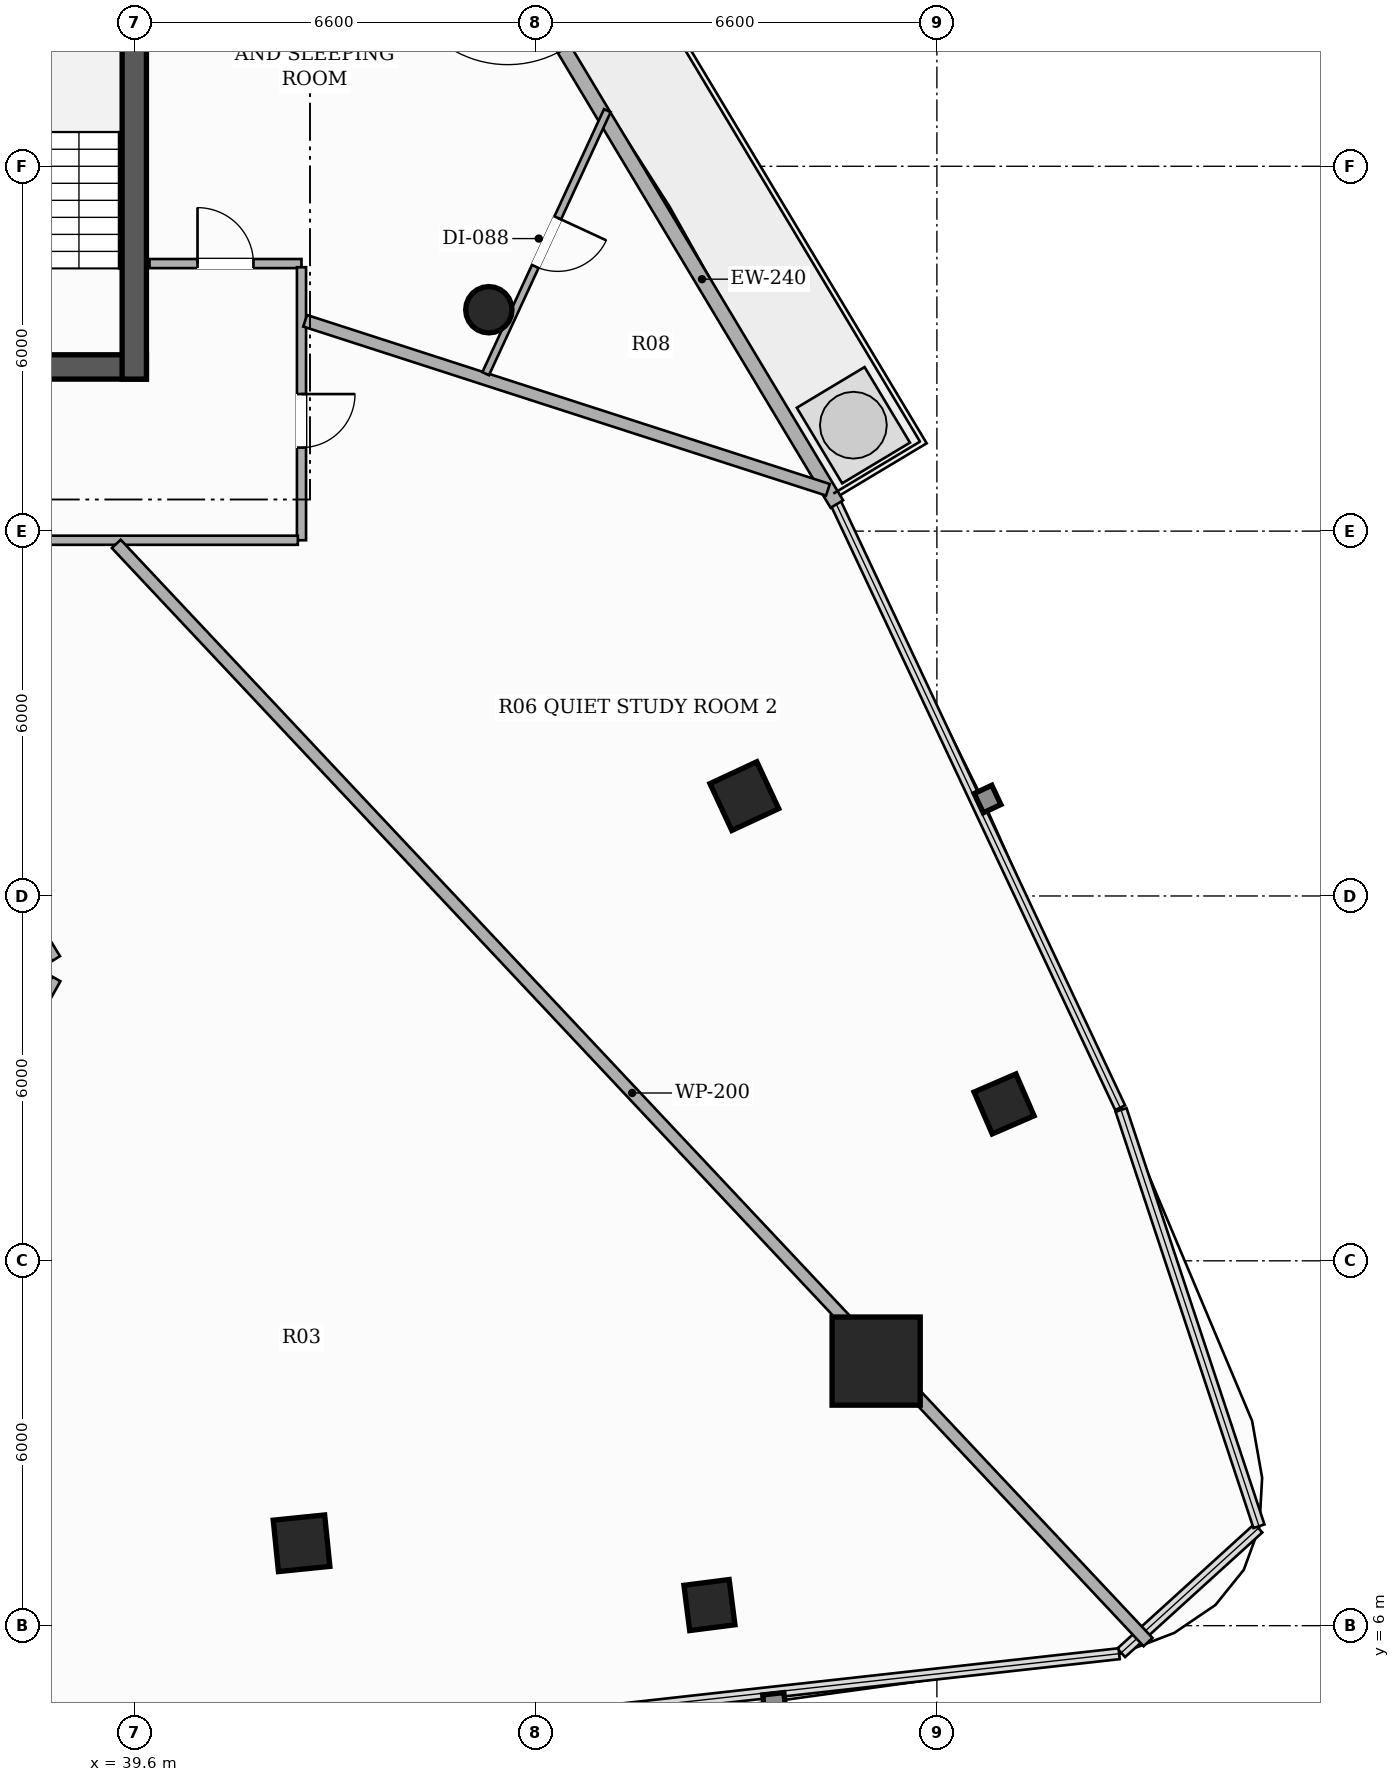
"""IFC4 building model, lengths in metres.
Left out: names, types, materials, properties, quantities, classifications, styles, units other than length and angle.
Written with IfcOpenShell. Run it as: python <this file> out.ifc"""

import sys

from ifc_helpers import new_model, si_unit, direction, frame, frame_2d, origin, origin_2d, place, context, subcontext, project, spatial, rectangle, hollow_rectangle, hollow_circle, extrude, element, fill, save


model = new_model("IFC4")
c1 = context("Model", 3, precision=1e-05, world=origin(), true_north=direction((0.0, 1.0)))
c2 = subcontext(c1, "Body", "Model", "MODEL_VIEW")
j1 = project(units=[si_unit("LENGTHUNIT", "METRE"), si_unit("PLANEANGLEUNIT", "RADIAN")], contexts=[c1])
p1 = place(None, origin())
s1 = spatial("IfcSite", under=j1, at=p1, CompositionType="ELEMENT")
p2 = place(p1, origin())
s2 = spatial("IfcBuilding", under=s1, at=p2, CompositionType="ELEMENT")
p3 = place(p2, frame((0.0, 0.0, 157.25)))
s3 = spatial("IfcBuildingStorey", under=s2, at=p3, CompositionType="ELEMENT", Elevation=157.25)
p4 = place(p3, frame((26.2, 26.7, 0.0), z_axis=(0.0, 0.0, 1.0), x_axis=(1.0, 0.0, 0.0)))
e1 = element("IfcWall", 1, at=p4, inside=s3, PredefinedType="SHEAR", context=c2, shape_type="SweptSolid", body=[
    extrude(rectangle(XDim=13.6, YDim=0.4, at=frame_2d((6.8, 0.0))), origin(), (0.0, 0.0, 1.0), 3.3),
])
p5 = place(p4, frame((4.35, 0.0, 0.0)))
e2 = element("IfcOpeningElement", 2, at=p5, cuts=e1, PredefinedType="OPENING", context=c2, shape_type="SweptSolid", body=[
    extrude(rectangle(XDim=1.05, YDim=2.15, at=frame_2d((0.525, 1.075))), frame((0.0, 0.21, 0.0), z_axis=(0.0, -1.0, 0.0), x_axis=(1.0, 0.0, 0.0)), (0.0, 0.0, 1.0), 0.42),
])
p6 = place(p4, frame((8.3, 0.0, 0.0)))
e3 = element("IfcOpeningElement", 3, at=p6, cuts=e1, PredefinedType="OPENING", context=c2, shape_type="SweptSolid", body=[
    extrude(rectangle(XDim=1.05, YDim=2.15, at=frame_2d((0.525, 1.075))), frame((0.0, 0.21, 0.0), z_axis=(0.0, -1.0, 0.0), x_axis=(1.0, 0.0, 0.0)), (0.0, 0.0, 1.0), 0.42),
])
p7 = place(p3, frame((39.6, 26.5, 0.0), z_axis=(0.0, 0.0, 1.0), x_axis=(0.0, 1.0, 0.0)))
e4 = element("IfcWall", 4, at=p7, inside=s3, PredefinedType="SHEAR", context=c2, shape_type="SweptSolid", body=[
    extrude(rectangle(XDim=7.6, YDim=0.4, at=frame_2d((3.8, 0.0))), origin(), (0.0, 0.0, 1.0), 3.3),
])
p8 = place(p3, frame((51.801, 10.351, 0.0), z_axis=(0.0, 0.0, 1.0), x_axis=(1.0, 0.0, 0.0)))
e5 = element("IfcColumn", 5, at=p8, inside=s3, PredefinedType="COLUMN", context=c2, shape_type="SweptSolid", body=[
    extrude(hollow_rectangle(XDim=1.45, YDim=1.45, WallThickness=0.045, at=origin_2d()), origin(), (0.0, 0.0, 1.0), 3.3),
])
for number, where, z_axis, x_axis in (
    (6, (42.351, 7.355, 0.0), (0.0, 0.0, 1.0), (0.995, 0.101, 0.0)),
    (7, (49.633, 19.642, 0.0), (0.0, 0.0, 1.0), (-0.423, 0.906, 0.0)),
):
    element("IfcColumn", number, at=place(p3, frame(where, z_axis=z_axis, x_axis=x_axis)), inside=s3, PredefinedType="COLUMN", context=c2, shape_type="SweptSolid", body=[
        extrude(hollow_rectangle(XDim=0.85, YDim=0.85, WallThickness=0.028, at=origin_2d()), origin(), (0.0, 0.0, 1.0), 3.3),
    ])
p9 = place(p3, frame((45.431, 27.641, 0.0), z_axis=(0.0, 0.0, 1.0), x_axis=(1.0, 0.0, 0.0)))
e8 = element("IfcColumn", 8, at=p9, inside=s3, PredefinedType="COLUMN", context=c2, shape_type="SweptSolid", body=[
    extrude(hollow_circle(Radius=0.381, WallThickness=0.022, at=origin_2d()), origin(), (0.0, 0.0, 1.0), 3.3),
])
for number, where, z_axis, x_axis in (
    (9, (49.059, 6.339, 0.0), (0.0, 0.0, 1.0), (0.992, 0.127, 0.0)),
    (10, (53.905, 14.58, 0.0), (0.0, 0.0, 1.0), (-0.397, 0.918, 0.0)),
):
    element("IfcColumn", number, at=place(p3, frame(where, z_axis=z_axis, x_axis=x_axis)), inside=s3, PredefinedType="COLUMN", context=c2, shape_type="SweptSolid", body=[
        extrude(hollow_rectangle(XDim=0.75, YDim=0.75, WallThickness=0.025, at=origin_2d()), origin(), (0.0, 0.0, 1.0), 3.3),
    ])
p10 = place(p3, frame((51.155, 24.445, 0.0), z_axis=(0.0, 0.0, 1.0), x_axis=(-0.514335781973, 0.857588889493, 0.0)))
e11 = element("IfcWall", 11, at=p10, inside=s3, PredefinedType="SOLIDWALL", context=c2, shape_type="SweptSolid", body=[
    extrude(rectangle(XDim=11.222, YDim=0.24, at=frame_2d((5.611, 0.0))), origin(), (0.0, 0.0, 1.0), 2.624),
])
p11 = place(p10, frame((8.725, 0.0, 0.0)))
e12 = element("IfcOpeningElement", 12, at=p11, cuts=e11, PredefinedType="OPENING", context=c2, shape_type="SweptSolid", body=[
    extrude(rectangle(XDim=1.8, YDim=2.2, at=frame_2d((0.9, 1.1))), frame((0.0, 0.13, 0.0), z_axis=(0.0, -1.0, 0.0), x_axis=(1.0, 0.0, 0.0)), (0.0, 0.0, 1.0), 0.26),
])
p12 = place(p3, frame((39.85, 28.4, 0.0), z_axis=(0.0, 0.0, 1.0), x_axis=(1.0, 0.0, 0.0)))
e13 = element("IfcWall", 13, at=p12, inside=s3, PredefinedType="PARTITIONING", context=c2, shape_type="SweptSolid", body=[
    extrude(rectangle(XDim=2.5, YDim=0.15, at=frame_2d((1.25, 0.0))), origin(), (0.0, 0.0, 1.0), 2.721),
])
p13 = place(p12, frame((0.79, 0.0, 0.0)))
e14 = element("IfcOpeningElement", 14, at=p13, cuts=e13, PredefinedType="OPENING", context=c2, shape_type="SweptSolid", body=[
    extrude(rectangle(XDim=0.92, YDim=2.15, at=frame_2d((0.46, 1.075))), frame((0.0, 0.085, 0.0), z_axis=(0.0, -1.0, 0.0), x_axis=(1.0, 0.0, 0.0)), (0.0, 0.0, 1.0), 0.17),
])
p14 = place(p3, frame((42.35, 28.34, 0.0), z_axis=(0.0, 0.0, 1.0), x_axis=(0.0, -1.0, 0.0)))
e15 = element("IfcWall", 15, at=p14, inside=s3, PredefinedType="PARTITIONING", context=c2, shape_type="SweptSolid", body=[
    extrude(rectangle(XDim=4.49, YDim=0.15, at=frame_2d((2.245, 0.0))), origin(), (0.0, 0.0, 1.0), 2.721),
])
p15 = place(p14, frame((2.086, 0.0, 0.0)))
e16 = element("IfcOpeningElement", 16, at=p15, cuts=e15, PredefinedType="OPENING", context=c2, shape_type="SweptSolid", body=[
    extrude(rectangle(XDim=0.88, YDim=2.1, at=frame_2d((0.44, 1.05))), frame((0.0, 0.085, 0.0), z_axis=(0.0, -1.0, 0.0), x_axis=(1.0, 0.0, 0.0)), (0.0, 0.0, 1.0), 0.17),
])
p16 = place(p3, frame((42.29, 23.85, 0.0), z_axis=(0.0, 0.0, 1.0), x_axis=(-1.0, 0.0, 0.0)))
e17 = element("IfcWall", 17, at=p16, inside=s3, PredefinedType="PARTITIONING", context=c2, shape_type="SweptSolid", body=[
    extrude(rectangle(XDim=8.179, YDim=0.15, at=frame_2d((4.089, 0.0))), origin(), (0.0, 0.0, 1.0), 2.492),
])
p17 = place(p16, frame((4.98, 0.0, 0.0)))
e18 = element("IfcOpeningElement", 18, at=p17, cuts=e17, PredefinedType="OPENING", context=c2, shape_type="SweptSolid", body=[
    extrude(rectangle(XDim=0.88, YDim=2.1, at=frame_2d((0.44, 1.05))), frame((0.0, 0.085, 0.0), z_axis=(0.0, -1.0, 0.0), x_axis=(1.0, 0.0, 0.0)), (0.0, 0.0, 1.0), 0.17),
])
p18 = place(p3, frame((34.147, 23.79, 0.0), z_axis=(0.0, 0.0, 1.0), x_axis=(0.521429001816, -0.853294671298, 0.0)))
e19 = element("IfcWall", 19, at=p18, inside=s3, PredefinedType="PARTITIONING", context=c2, shape_type="SweptSolid", body=[
    extrude(rectangle(XDim=7.991, YDim=0.15, at=frame_2d((3.996, 0.0))), origin(), (0.0, 0.0, 1.0), 2.721),
])
p19 = place(p3, frame((38.32, 16.635, 0.0), z_axis=(0.0, 0.0, 1.0), x_axis=(-0.489202035948, -0.872170492521, 0.0)))
e20 = element("IfcWall", 20, at=p19, inside=s3, PredefinedType="PARTITIONING", context=c2, shape_type="SweptSolid", body=[
    extrude(rectangle(XDim=1.018, YDim=0.15, at=frame_2d((0.509, 0.0))), origin(), (0.0, 0.0, 1.0), 3.06),
])
p20 = place(p3, frame((39.304, 23.79, 0.0), z_axis=(0.0, 0.0, 1.0), x_axis=(0.684750154022, -0.72877789934, 0.0)))
e21 = element("IfcWall", 21, at=p20, inside=s3, PredefinedType="PARTITIONING", context=c2, shape_type="SweptSolid", body=[
    extrude(rectangle(XDim=24.781, YDim=0.2, at=frame_2d((12.391, 0.0))), origin(), (0.0, 0.0, 1.0), 2.413),
])
p21 = place(p3, frame((42.41, 27.459, 0.0), z_axis=(0.0, 0.0, 1.0), x_axis=(0.951531988225, -0.307549793343, 0.0)))
e22 = element("IfcWall", 22, at=p21, inside=s3, PredefinedType="PARTITIONING", context=c2, shape_type="SweptSolid", body=[
    extrude(rectangle(XDim=9.036, YDim=0.2, at=frame_2d((4.518, 0.0))), origin(), (0.0, 0.0, 1.0), 2.413),
])
p22 = place(p3, frame((47.38, 30.915, 0.0), z_axis=(0.0, 0.0, 1.0), x_axis=(-0.419818119852, -0.907608255936, 0.0)))
e23 = element("IfcWall", 23, at=p22, inside=s3, PredefinedType="PARTITIONING", context=c2, shape_type="SweptSolid", body=[
    extrude(rectangle(XDim=4.766, YDim=0.12, at=frame_2d((2.383, 0.0))), origin(), (0.0, 0.0, 1.0), 2.413),
])
p23 = place(p22, frame((1.943, 0.0, 0.0)))
e24 = element("IfcOpeningElement", 24, at=p23, cuts=e23, PredefinedType="OPENING", context=c2, shape_type="SweptSolid", body=[
    extrude(rectangle(XDim=0.88, YDim=2.1, at=frame_2d((0.44, 1.05))), frame((0.0, 0.07, 0.0), z_axis=(0.0, -1.0, 0.0), x_axis=(1.0, 0.0, 0.0)), (0.0, 0.0, 1.0), 0.14),
])
p24 = place(p15, origin())
e25 = element("IfcDoor", 25, at=p24, inside=s3, OperationType="SINGLE_SWING_LEFT", PredefinedType="DOOR", context=c2, shape_type="SweptSolid", body=[
    extrude(rectangle(XDim=0.88, YDim=2.1, at=frame_2d((0.44, 1.05))), frame((0.0, 0.025, 0.0), z_axis=(0.0, -1.0, 0.0), x_axis=(1.0, 0.0, 0.0)), (0.0, 0.0, 1.0), 0.05),
])
fill(e16, e25)
p25 = place(p13, origin())
e26 = element("IfcDoor", 26, at=p25, inside=s3, OperationType="SINGLE_SWING_LEFT", PredefinedType="DOOR", context=c2, shape_type="SweptSolid", body=[
    extrude(rectangle(XDim=0.92, YDim=2.15, at=frame_2d((0.46, 1.075))), frame((0.0, 0.025, 0.0), z_axis=(0.0, -1.0, 0.0), x_axis=(1.0, 0.0, 0.0)), (0.0, 0.0, 1.0), 0.05),
])
fill(e14, e26)
p26 = place(p23, origin())
e27 = element("IfcDoor", 27, at=p26, inside=s3, OperationType="SINGLE_SWING_LEFT", PredefinedType="DOOR", context=c2, shape_type="SweptSolid", body=[
    extrude(rectangle(XDim=0.88, YDim=2.1, at=frame_2d((0.44, 1.05))), frame((0.0, 0.025, 0.0), z_axis=(0.0, -1.0, 0.0), x_axis=(1.0, 0.0, 0.0)), (0.0, 0.0, 1.0), 0.05),
])
fill(e24, e27)
save(model, sys.argv[1])
